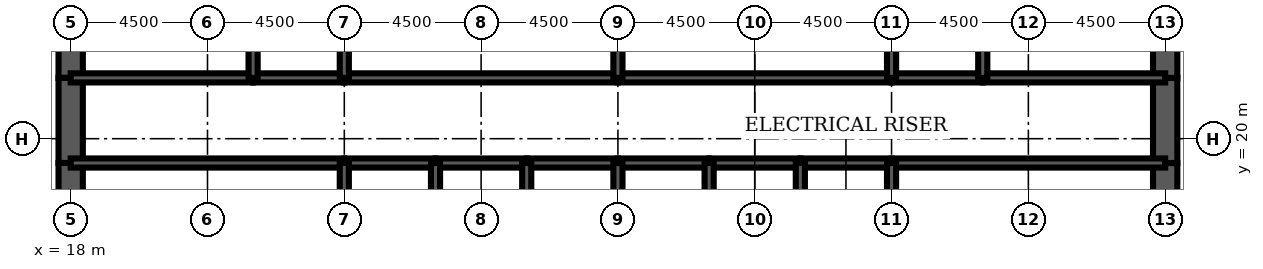
"""IFC4 building model, lengths in metres.
Left out: names, types, materials, properties, quantities, classifications, styles, units other than length and angle.
Written with IfcOpenShell. Run it as: python <this file> out.ifc"""

import sys

from ifc_helpers import new_model, si_unit, direction, frame, frame_2d, origin, place, context, subcontext, project, spatial, rectangle, extrude, element, fill, save


model = new_model("IFC4")
c1 = context("Model", 3, precision=1e-05, world=origin(), true_north=direction((0.0, 1.0)))
c2 = subcontext(c1, "Body", "Model", "MODEL_VIEW")
j1 = project(units=[si_unit("LENGTHUNIT", "METRE"), si_unit("PLANEANGLEUNIT", "RADIAN")], contexts=[c1])
p1 = place(None, origin())
s1 = spatial("IfcSite", under=j1, at=p1, CompositionType="ELEMENT")
p2 = place(p1, origin())
s2 = spatial("IfcBuilding", under=s1, at=p2, CompositionType="ELEMENT")
p3 = place(p2, frame((0.0, 0.0, 248.8)))
s3 = spatial("IfcBuildingStorey", under=s2, at=p3, CompositionType="ELEMENT", Elevation=248.8)
p4 = place(p3, frame((18.0, 26.0, 0.0), z_axis=(0.0, 0.0, 1.0), x_axis=(0.0, -1.0, 0.0)))
e1 = element("IfcWall", 1, at=p4, inside=s3, PredefinedType="SHEAR", context=c2, shape_type="SweptSolid", body=[
    extrude(rectangle(XDim=4.0, YDim=0.8, at=frame_2d((2.0, 0.0))), origin(), (0.0, 0.0, 1.0), 4.2),
])
p5 = place(p3, frame((18.0, 22.0, 0.0), z_axis=(0.0, 0.0, 1.0), x_axis=(0.0, -1.0, 0.0)))
e2 = element("IfcWall", 2, at=p5, inside=s3, PredefinedType="SHEAR", context=c2, shape_type="SweptSolid", body=[
    extrude(rectangle(XDim=2.8, YDim=0.8, at=frame_2d((1.4, 0.0))), origin(), (0.0, 0.0, 1.0), 4.2),
])
p6 = place(p5, frame((0.6, 0.0, 0.0)))
e3 = element("IfcOpeningElement", 3, at=p6, cuts=e2, PredefinedType="OPENING", context=c2, shape_type="SweptSolid", body=[
    extrude(rectangle(XDim=1.8, YDim=2.1, at=frame_2d((0.9, 1.05))), frame((0.0, 0.41, 0.0), z_axis=(0.0, -1.0, 0.0), x_axis=(1.0, 0.0, 0.0)), (0.0, 0.0, 1.0), 0.82),
])
for number, where, z_axis, x_axis in (
    (4, (18.0, 19.2, 0.0), (0.0, 0.0, 1.0), (0.0, -1.0, 0.0)),
    (5, (54.0, 16.0, 0.0), (0.0, 0.0, 1.0), (0.0, 1.0, 0.0)),
):
    element("IfcWall", number, at=place(p3, frame(where, z_axis=z_axis, x_axis=x_axis)), inside=s3, PredefinedType="SHEAR", context=c2, shape_type="SweptSolid", body=[
        extrude(rectangle(XDim=3.2, YDim=0.8, at=frame_2d((1.6, 0.0))), origin(), (0.0, 0.0, 1.0), 4.2),
    ])
p7 = place(p3, frame((54.0, 19.2, 0.0), z_axis=(0.0, 0.0, 1.0), x_axis=(0.0, 1.0, 0.0)))
e6 = element("IfcWall", 6, at=p7, inside=s3, PredefinedType="SHEAR", context=c2, shape_type="SweptSolid", body=[
    extrude(rectangle(XDim=2.8, YDim=0.8, at=frame_2d((1.4, 0.0))), origin(), (0.0, 0.0, 1.0), 4.2),
])
p8 = place(p7, frame((0.4, 0.0, 0.0)))
e7 = element("IfcOpeningElement", 7, at=p8, cuts=e6, PredefinedType="OPENING", context=c2, shape_type="SweptSolid", body=[
    extrude(rectangle(XDim=1.8, YDim=2.1, at=frame_2d((0.9, 1.05))), frame((0.0, 0.41, 0.0), z_axis=(0.0, -1.0, 0.0), x_axis=(1.0, 0.0, 0.0)), (0.0, 0.0, 1.0), 0.82),
])
p9 = place(p3, frame((54.0, 22.0, 0.0), z_axis=(0.0, 0.0, 1.0), x_axis=(0.0, 1.0, 0.0)))
e8 = element("IfcWall", 8, at=p9, inside=s3, PredefinedType="SHEAR", context=c2, shape_type="SweptSolid", body=[
    extrude(rectangle(XDim=4.0, YDim=0.8, at=frame_2d((2.0, 0.0))), origin(), (0.0, 0.0, 1.0), 4.2),
])
p10 = place(p3, frame((18.0, 19.2, 0.0), z_axis=(0.0, 0.0, 1.0), x_axis=(1.0, 0.0, 0.0)))
e9 = element("IfcWall", 9, at=p10, inside=s3, PredefinedType="SOLIDWALL", context=c2, shape_type="SweptSolid", body=[
    extrude(rectangle(XDim=9.0, YDim=0.3, at=frame_2d((4.5, 0.0))), origin(), (0.0, 0.0, 1.0), 4.2),
])
p11 = place(p10, frame((0.65, 0.0, 0.0)))
e10 = element("IfcOpeningElement", 10, at=p11, cuts=e9, PredefinedType="OPENING", context=c2, shape_type="SweptSolid", body=[
    extrude(rectangle(XDim=1.0, YDim=2.1, at=frame_2d((0.5, 1.05))), frame((0.0, 0.16, 0.0), z_axis=(0.0, -1.0, 0.0), x_axis=(1.0, 0.0, 0.0)), (0.0, 0.0, 1.0), 0.32),
])
p12 = place(p3, frame((27.0, 19.2, 0.0), z_axis=(0.0, 0.0, 1.0), x_axis=(1.0, 0.0, 0.0)))
e11 = element("IfcWall", 11, at=p12, inside=s3, PredefinedType="SOLIDWALL", context=c2, shape_type="SweptSolid", body=[
    extrude(rectangle(XDim=3.0, YDim=0.3, at=frame_2d((1.5, 0.0))), origin(), (0.0, 0.0, 1.0), 4.2),
])
p13 = place(p12, frame((0.95, 0.0, 0.0)))
e12 = element("IfcOpeningElement", 12, at=p13, cuts=e11, PredefinedType="OPENING", context=c2, shape_type="SweptSolid", body=[
    extrude(rectangle(XDim=1.1, YDim=2.2, at=frame_2d((0.55, 1.1))), frame((0.0, 0.16, 0.0), z_axis=(0.0, -1.0, 0.0), x_axis=(1.0, 0.0, 0.0)), (0.0, 0.0, 1.0), 0.32),
])
p14 = place(p3, frame((30.0, 19.2, 0.0), z_axis=(0.0, 0.0, 1.0), x_axis=(1.0, 0.0, 0.0)))
e13 = element("IfcWall", 13, at=p14, inside=s3, PredefinedType="SOLIDWALL", context=c2, shape_type="SweptSolid", body=[
    extrude(rectangle(XDim=3.0, YDim=0.3, at=frame_2d((1.5, 0.0))), origin(), (0.0, 0.0, 1.0), 4.2),
])
p15 = place(p14, frame((0.95, 0.0, 0.0)))
e14 = element("IfcOpeningElement", 14, at=p15, cuts=e13, PredefinedType="OPENING", context=c2, shape_type="SweptSolid", body=[
    extrude(rectangle(XDim=1.1, YDim=2.2, at=frame_2d((0.55, 1.1))), frame((0.0, 0.16, 0.0), z_axis=(0.0, -1.0, 0.0), x_axis=(1.0, 0.0, 0.0)), (0.0, 0.0, 1.0), 0.32),
])
p16 = place(p3, frame((33.0, 19.2, 0.0), z_axis=(0.0, 0.0, 1.0), x_axis=(1.0, 0.0, 0.0)))
e15 = element("IfcWall", 15, at=p16, inside=s3, PredefinedType="SOLIDWALL", context=c2, shape_type="SweptSolid", body=[
    extrude(rectangle(XDim=3.0, YDim=0.3, at=frame_2d((1.5, 0.0))), origin(), (0.0, 0.0, 1.0), 4.2),
])
p17 = place(p16, frame((0.95, 0.0, 0.0)))
e16 = element("IfcOpeningElement", 16, at=p17, cuts=e15, PredefinedType="OPENING", context=c2, shape_type="SweptSolid", body=[
    extrude(rectangle(XDim=1.1, YDim=2.2, at=frame_2d((0.55, 1.1))), frame((0.0, 0.16, 0.0), z_axis=(0.0, -1.0, 0.0), x_axis=(1.0, 0.0, 0.0)), (0.0, 0.0, 1.0), 0.32),
])
p18 = place(p3, frame((36.0, 19.2, 0.0), z_axis=(0.0, 0.0, 1.0), x_axis=(1.0, 0.0, 0.0)))
e17 = element("IfcWall", 17, at=p18, inside=s3, PredefinedType="SOLIDWALL", context=c2, shape_type="SweptSolid", body=[
    extrude(rectangle(XDim=3.0, YDim=0.3, at=frame_2d((1.5, 0.0))), origin(), (0.0, 0.0, 1.0), 4.2),
])
p19 = place(p18, frame((0.95, 0.0, 0.0)))
e18 = element("IfcOpeningElement", 18, at=p19, cuts=e17, PredefinedType="OPENING", context=c2, shape_type="SweptSolid", body=[
    extrude(rectangle(XDim=1.1, YDim=2.2, at=frame_2d((0.55, 1.1))), frame((0.0, 0.16, 0.0), z_axis=(0.0, -1.0, 0.0), x_axis=(1.0, 0.0, 0.0)), (0.0, 0.0, 1.0), 0.32),
])
p20 = place(p3, frame((39.0, 19.2, 0.0), z_axis=(0.0, 0.0, 1.0), x_axis=(1.0, 0.0, 0.0)))
e19 = element("IfcWall", 19, at=p20, inside=s3, PredefinedType="SOLIDWALL", context=c2, shape_type="SweptSolid", body=[
    extrude(rectangle(XDim=3.0, YDim=0.3, at=frame_2d((1.5, 0.0))), origin(), (0.0, 0.0, 1.0), 4.2),
])
p21 = place(p20, frame((1.0, 0.0, 0.0)))
e20 = element("IfcOpeningElement", 20, at=p21, cuts=e19, PredefinedType="OPENING", context=c2, shape_type="SweptSolid", body=[
    extrude(rectangle(XDim=1.0, YDim=2.1, at=frame_2d((0.5, 1.05))), frame((0.0, 0.16, 0.0), z_axis=(0.0, -1.0, 0.0), x_axis=(1.0, 0.0, 0.0)), (0.0, 0.0, 1.0), 0.32),
])
p22 = place(p3, frame((42.0, 19.2, 0.0), z_axis=(0.0, 0.0, 1.0), x_axis=(1.0, 0.0, 0.0)))
e21 = element("IfcWall", 21, at=p22, inside=s3, PredefinedType="SOLIDWALL", context=c2, shape_type="SweptSolid", body=[
    extrude(rectangle(XDim=3.0, YDim=0.3, at=frame_2d((1.5, 0.0))), origin(), (0.0, 0.0, 1.0), 4.2),
])
p23 = place(p22, frame((1.0, 0.0, 0.0)))
e22 = element("IfcOpeningElement", 22, at=p23, cuts=e21, PredefinedType="OPENING", context=c2, shape_type="SweptSolid", body=[
    extrude(rectangle(XDim=1.0, YDim=2.1, at=frame_2d((0.5, 1.05))), frame((0.0, 0.16, 0.0), z_axis=(0.0, -1.0, 0.0), x_axis=(1.0, 0.0, 0.0)), (0.0, 0.0, 1.0), 0.32),
])
p24 = place(p3, frame((45.0, 19.2, 0.0), z_axis=(0.0, 0.0, 1.0), x_axis=(1.0, 0.0, 0.0)))
e23 = element("IfcWall", 23, at=p24, inside=s3, PredefinedType="SOLIDWALL", context=c2, shape_type="SweptSolid", body=[
    extrude(rectangle(XDim=9.0, YDim=0.3, at=frame_2d((4.5, 0.0))), origin(), (0.0, 0.0, 1.0), 4.2),
])
p25 = place(p24, frame((7.35, 0.0, 0.0)))
e24 = element("IfcOpeningElement", 24, at=p25, cuts=e23, PredefinedType="OPENING", context=c2, shape_type="SweptSolid", body=[
    extrude(rectangle(XDim=1.0, YDim=2.1, at=frame_2d((0.5, 1.05))), frame((0.0, 0.16, 0.0), z_axis=(0.0, -1.0, 0.0), x_axis=(1.0, 0.0, 0.0)), (0.0, 0.0, 1.0), 0.32),
])
p26 = place(p3, frame((18.0, 22.0, 0.0), z_axis=(0.0, 0.0, 1.0), x_axis=(1.0, 0.0, 0.0)))
e25 = element("IfcWall", 25, at=p26, inside=s3, PredefinedType="SOLIDWALL", context=c2, shape_type="SweptSolid", body=[
    extrude(rectangle(XDim=6.0, YDim=0.3, at=frame_2d((3.0, 0.0))), origin(), (0.0, 0.0, 1.0), 4.2),
])
p27 = place(p26, frame((4.4, 0.0, 0.0)))
e26 = element("IfcOpeningElement", 26, at=p27, cuts=e25, PredefinedType="OPENING", context=c2, shape_type="SweptSolid", body=[
    extrude(rectangle(XDim=1.0, YDim=2.1, at=frame_2d((0.5, 1.05))), frame((0.0, 0.16, 0.0), z_axis=(0.0, -1.0, 0.0), x_axis=(1.0, 0.0, 0.0)), (0.0, 0.0, 1.0), 0.32),
])
p28 = place(p26, frame((0.95, 0.0, 0.0)))
e27 = element("IfcOpeningElement", 27, at=p28, cuts=e25, PredefinedType="OPENING", context=c2, shape_type="SweptSolid", body=[
    extrude(rectangle(XDim=1.0, YDim=2.1, at=frame_2d((0.5, 1.05))), frame((0.0, 0.16, 0.0), z_axis=(0.0, -1.0, 0.0), x_axis=(1.0, 0.0, 0.0)), (0.0, 0.0, 1.0), 0.32),
])
p29 = place(p3, frame((24.0, 22.0, 0.0), z_axis=(0.0, 0.0, 1.0), x_axis=(1.0, 0.0, 0.0)))
e28 = element("IfcWall", 28, at=p29, inside=s3, PredefinedType="SOLIDWALL", context=c2, shape_type="SweptSolid", body=[
    extrude(rectangle(XDim=3.0, YDim=0.3, at=frame_2d((1.5, 0.0))), origin(), (0.0, 0.0, 1.0), 4.2),
])
p30 = place(p29, frame((1.0, 0.0, 0.0)))
e29 = element("IfcOpeningElement", 29, at=p30, cuts=e28, PredefinedType="OPENING", context=c2, shape_type="SweptSolid", body=[
    extrude(rectangle(XDim=1.0, YDim=2.1, at=frame_2d((0.5, 1.05))), frame((0.0, 0.16, 0.0), z_axis=(0.0, -1.0, 0.0), x_axis=(1.0, 0.0, 0.0)), (0.0, 0.0, 1.0), 0.32),
])
p31 = place(p3, frame((27.0, 22.0, 0.0), z_axis=(0.0, 0.0, 1.0), x_axis=(1.0, 0.0, 0.0)))
e30 = element("IfcWall", 30, at=p31, inside=s3, PredefinedType="SOLIDWALL", context=c2, shape_type="SweptSolid", body=[
    extrude(rectangle(XDim=9.0, YDim=0.3, at=frame_2d((4.5, 0.0))), origin(), (0.0, 0.0, 1.0), 4.2),
])
p32 = place(p31, frame((4.0, 0.0, 0.0)))
e31 = element("IfcOpeningElement", 31, at=p32, cuts=e30, PredefinedType="OPENING", context=c2, shape_type="SweptSolid", body=[
    extrude(rectangle(XDim=1.0, YDim=2.1, at=frame_2d((0.5, 1.05))), frame((0.0, 0.16, 0.0), z_axis=(0.0, -1.0, 0.0), x_axis=(1.0, 0.0, 0.0)), (0.0, 0.0, 1.0), 0.32),
])
p33 = place(p3, frame((36.0, 22.0, 0.0), z_axis=(0.0, 0.0, 1.0), x_axis=(1.0, 0.0, 0.0)))
e32 = element("IfcWall", 32, at=p33, inside=s3, PredefinedType="SOLIDWALL", context=c2, shape_type="SweptSolid", body=[
    extrude(rectangle(XDim=9.0, YDim=0.3, at=frame_2d((4.5, 0.0))), origin(), (0.0, 0.0, 1.0), 4.2),
])
p34 = place(p33, frame((4.0, 0.0, 0.0)))
e33 = element("IfcOpeningElement", 33, at=p34, cuts=e32, PredefinedType="OPENING", context=c2, shape_type="SweptSolid", body=[
    extrude(rectangle(XDim=1.0, YDim=2.1, at=frame_2d((0.5, 1.05))), frame((0.0, 0.16, 0.0), z_axis=(0.0, -1.0, 0.0), x_axis=(1.0, 0.0, 0.0)), (0.0, 0.0, 1.0), 0.32),
])
p35 = place(p3, frame((45.0, 22.0, 0.0), z_axis=(0.0, 0.0, 1.0), x_axis=(1.0, 0.0, 0.0)))
e34 = element("IfcWall", 34, at=p35, inside=s3, PredefinedType="SOLIDWALL", context=c2, shape_type="SweptSolid", body=[
    extrude(rectangle(XDim=3.0, YDim=0.3, at=frame_2d((1.5, 0.0))), origin(), (0.0, 0.0, 1.0), 4.2),
])
p36 = place(p35, frame((1.0, 0.0, 0.0)))
e35 = element("IfcOpeningElement", 35, at=p36, cuts=e34, PredefinedType="OPENING", context=c2, shape_type="SweptSolid", body=[
    extrude(rectangle(XDim=1.0, YDim=2.1, at=frame_2d((0.5, 1.05))), frame((0.0, 0.16, 0.0), z_axis=(0.0, -1.0, 0.0), x_axis=(1.0, 0.0, 0.0)), (0.0, 0.0, 1.0), 0.32),
])
p37 = place(p3, frame((48.0, 22.0, 0.0), z_axis=(0.0, 0.0, 1.0), x_axis=(1.0, 0.0, 0.0)))
e36 = element("IfcWall", 36, at=p37, inside=s3, PredefinedType="SOLIDWALL", context=c2, shape_type="SweptSolid", body=[
    extrude(rectangle(XDim=6.0, YDim=0.3, at=frame_2d((3.0, 0.0))), origin(), (0.0, 0.0, 1.0), 4.2),
])
p38 = place(p37, frame((2.0, 0.0, 0.0)))
e37 = element("IfcOpeningElement", 37, at=p38, cuts=e36, PredefinedType="OPENING", context=c2, shape_type="SweptSolid", body=[
    extrude(rectangle(XDim=1.0, YDim=2.1, at=frame_2d((0.5, 1.05))), frame((0.0, 0.16, 0.0), z_axis=(0.0, -1.0, 0.0), x_axis=(1.0, 0.0, 0.0)), (0.0, 0.0, 1.0), 0.32),
])
for number, where, z_axis, x_axis in (
    (38, (27.0, 16.0, 0.0), (0.0, 0.0, 1.0), (0.0, 1.0, 0.0)),
    (39, (30.0, 16.0, 0.0), (0.0, 0.0, 1.0), (0.0, 1.0, 0.0)),
    (40, (33.0, 16.0, 0.0), (0.0, 0.0, 1.0), (0.0, 1.0, 0.0)),
    (41, (36.0, 16.0, 0.0), (0.0, 0.0, 1.0), (0.0, 1.0, 0.0)),
    (42, (39.0, 16.0, 0.0), (0.0, 0.0, 1.0), (0.0, 1.0, 0.0)),
    (43, (42.0, 16.0, 0.0), (0.0, 0.0, 1.0), (0.0, 1.0, 0.0)),
    (44, (45.0, 16.0, 0.0), (0.0, 0.0, 1.0), (0.0, 1.0, 0.0)),
):
    element("IfcWall", number, at=place(p3, frame(where, z_axis=z_axis, x_axis=x_axis)), inside=s3, PredefinedType="SOLIDWALL", context=c2, shape_type="SweptSolid", body=[
        extrude(rectangle(XDim=3.2, YDim=0.3, at=frame_2d((1.6, 0.0))), origin(), (0.0, 0.0, 1.0), 4.2),
    ])
for number, where, z_axis, x_axis in (
    (45, (24.0, 22.0, 0.0), (0.0, 0.0, 1.0), (0.0, 1.0, 0.0)),
    (46, (27.0, 22.0, 0.0), (0.0, 0.0, 1.0), (0.0, 1.0, 0.0)),
    (47, (36.0, 22.0, 0.0), (0.0, 0.0, 1.0), (0.0, 1.0, 0.0)),
    (48, (45.0, 22.0, 0.0), (0.0, 0.0, 1.0), (0.0, 1.0, 0.0)),
    (49, (48.0, 22.0, 0.0), (0.0, 0.0, 1.0), (0.0, 1.0, 0.0)),
):
    element("IfcWall", number, at=place(p3, frame(where, z_axis=z_axis, x_axis=x_axis)), inside=s3, PredefinedType="SOLIDWALL", context=c2, shape_type="SweptSolid", body=[
        extrude(rectangle(XDim=4.0, YDim=0.3, at=frame_2d((2.0, 0.0))), origin(), (0.0, 0.0, 1.0), 4.2),
    ])
p39 = place(p3, frame((42.0, 22.15, 0.0), z_axis=(0.0, 0.0, 1.0), x_axis=(0.0, 1.0, 0.0)))
e50 = element("IfcWall", 50, at=p39, inside=s3, PredefinedType="PARTITIONING", context=c2, shape_type="SweptSolid", body=[
    extrude(rectangle(XDim=3.7, YDim=0.15, at=frame_2d((1.85, 0.0))), origin(), (0.0, 0.0, 1.0), 3.0),
])
p40 = place(p39, frame((2.2, 0.0, 0.0)))
e51 = element("IfcOpeningElement", 51, at=p40, cuts=e50, PredefinedType="OPENING", context=c2, shape_type="SweptSolid", body=[
    extrude(rectangle(XDim=1.0, YDim=2.1, at=frame_2d((0.5, 1.05))), frame((0.0, 0.085, 0.0), z_axis=(0.0, -1.0, 0.0), x_axis=(1.0, 0.0, 0.0)), (0.0, 0.0, 1.0), 0.17),
])
p41 = place(p3, frame((20.575, 22.15, 0.0), z_axis=(0.0, 0.0, 1.0), x_axis=(0.0, 1.0, 0.0)))
e52 = element("IfcWall", 52, at=p41, inside=s3, PredefinedType="PARTITIONING", context=c2, shape_type="SweptSolid", body=[
    extrude(rectangle(XDim=3.7, YDim=0.15, at=frame_2d((1.85, 0.0))), origin(), (0.0, 0.0, 1.0), 3.0),
])
p42 = place(p3, frame((49.4, 19.35, 0.0), z_axis=(0.0, 0.0, 1.0), x_axis=(0.0, 1.0, 0.0)))
e53 = element("IfcWall", 53, at=p42, inside=s3, PredefinedType="PARTITIONING", context=c2, shape_type="SweptSolid", body=[
    extrude(rectangle(XDim=2.5, YDim=0.15, at=frame_2d((1.25, 0.0))), origin(), (0.0, 0.0, 1.0), 3.0),
])
p43 = place(p42, frame((1.15, 0.0, 0.0)))
e54 = element("IfcOpeningElement", 54, at=p43, cuts=e53, PredefinedType="OPENING", context=c2, shape_type="SweptSolid", body=[
    extrude(rectangle(XDim=1.0, YDim=2.1, at=frame_2d((0.5, 1.05))), frame((0.0, 0.085, 0.0), z_axis=(0.0, -1.0, 0.0), x_axis=(1.0, 0.0, 0.0)), (0.0, 0.0, 1.0), 0.17),
])
p44 = place(p43, origin())
e55 = element("IfcDoor", 55, at=p44, inside=s3, OperationType="SINGLE_SWING_RIGHT", PredefinedType="DOOR", context=c2, shape_type="SweptSolid", body=[
    extrude(rectangle(XDim=1.0, YDim=2.1, at=frame_2d((0.5, 1.05))), frame((0.0, 0.025, 0.0), z_axis=(0.0, -1.0, 0.0), x_axis=(1.0, 0.0, 0.0)), (0.0, 0.0, 1.0), 0.05),
])
fill(e54, e55)
p45 = place(p13, origin())
e56 = element("IfcDoor", 56, at=p45, inside=s3, OperationType="DOUBLE_DOOR_SLIDING", PredefinedType="USERDEFINED", context=c2, shape_type="SweptSolid", body=[
    extrude(rectangle(XDim=1.1, YDim=2.2, at=frame_2d((0.55, 1.1))), frame((0.0, 0.025, 0.0), z_axis=(0.0, -1.0, 0.0), x_axis=(1.0, 0.0, 0.0)), (0.0, 0.0, 1.0), 0.05),
])
fill(e12, e56)
p46 = place(p15, origin())
e57 = element("IfcDoor", 57, at=p46, inside=s3, OperationType="DOUBLE_DOOR_SLIDING", PredefinedType="USERDEFINED", context=c2, shape_type="SweptSolid", body=[
    extrude(rectangle(XDim=1.1, YDim=2.2, at=frame_2d((0.55, 1.1))), frame((0.0, 0.025, 0.0), z_axis=(0.0, -1.0, 0.0), x_axis=(1.0, 0.0, 0.0)), (0.0, 0.0, 1.0), 0.05),
])
fill(e14, e57)
p47 = place(p17, origin())
e58 = element("IfcDoor", 58, at=p47, inside=s3, OperationType="DOUBLE_DOOR_SLIDING", PredefinedType="USERDEFINED", context=c2, shape_type="SweptSolid", body=[
    extrude(rectangle(XDim=1.1, YDim=2.2, at=frame_2d((0.55, 1.1))), frame((0.0, 0.025, 0.0), z_axis=(0.0, -1.0, 0.0), x_axis=(1.0, 0.0, 0.0)), (0.0, 0.0, 1.0), 0.05),
])
fill(e16, e58)
p48 = place(p19, origin())
e59 = element("IfcDoor", 59, at=p48, inside=s3, OperationType="DOUBLE_DOOR_SLIDING", PredefinedType="USERDEFINED", context=c2, shape_type="SweptSolid", body=[
    extrude(rectangle(XDim=1.1, YDim=2.2, at=frame_2d((0.55, 1.1))), frame((0.0, 0.025, 0.0), z_axis=(0.0, -1.0, 0.0), x_axis=(1.0, 0.0, 0.0)), (0.0, 0.0, 1.0), 0.05),
])
fill(e18, e59)
p49 = place(p11, origin())
e60 = element("IfcDoor", 60, at=p49, inside=s3, OperationType="SINGLE_SWING_LEFT", PredefinedType="DOOR", context=c2, shape_type="SweptSolid", body=[
    extrude(rectangle(XDim=1.0, YDim=2.1, at=frame_2d((0.5, 1.05))), frame((0.0, 0.025, 0.0), z_axis=(0.0, -1.0, 0.0), x_axis=(1.0, 0.0, 0.0)), (0.0, 0.0, 1.0), 0.05),
])
fill(e10, e60)
p50 = place(p25, origin())
e61 = element("IfcDoor", 61, at=p50, inside=s3, OperationType="SINGLE_SWING_RIGHT", PredefinedType="DOOR", context=c2, shape_type="SweptSolid", body=[
    extrude(rectangle(XDim=1.0, YDim=2.1, at=frame_2d((0.5, 1.05))), frame((0.0, 0.025, 0.0), z_axis=(0.0, -1.0, 0.0), x_axis=(1.0, 0.0, 0.0)), (0.0, 0.0, 1.0), 0.05),
])
fill(e24, e61)
p51 = place(p6, origin())
e62 = element("IfcDoor", 62, at=p51, inside=s3, OperationType="SINGLE_SWING_LEFT", PredefinedType="DOOR", context=c2, shape_type="SweptSolid", body=[
    extrude(rectangle(XDim=1.8, YDim=2.1, at=frame_2d((0.9, 1.05))), frame((0.0, 0.4, 0.0), z_axis=(0.0, -1.0, 0.0), x_axis=(1.0, 0.0, 0.0)), (0.0, 0.0, 1.0), 0.8),
])
fill(e3, e62)
p52 = place(p8, origin())
e63 = element("IfcDoor", 63, at=p52, inside=s3, OperationType="SINGLE_SWING_LEFT", PredefinedType="DOOR", context=c2, shape_type="SweptSolid", body=[
    extrude(rectangle(XDim=1.8, YDim=2.1, at=frame_2d((0.9, 1.05))), frame((0.0, 0.4, 0.0), z_axis=(0.0, -1.0, 0.0), x_axis=(1.0, 0.0, 0.0)), (0.0, 0.0, 1.0), 0.8),
])
fill(e7, e63)
p53 = place(p27, origin())
e64 = element("IfcDoor", 64, at=p53, inside=s3, OperationType="SINGLE_SWING_RIGHT", PredefinedType="DOOR", context=c2, shape_type="SweptSolid", body=[
    extrude(rectangle(XDim=1.0, YDim=2.1, at=frame_2d((0.5, 1.05))), frame((0.0, 0.025, 0.0), z_axis=(0.0, -1.0, 0.0), x_axis=(1.0, 0.0, 0.0)), (0.0, 0.0, 1.0), 0.05),
])
fill(e26, e64)
p54 = place(p30, origin())
e65 = element("IfcDoor", 65, at=p54, inside=s3, OperationType="SINGLE_SWING_LEFT", PredefinedType="DOOR", context=c2, shape_type="SweptSolid", body=[
    extrude(rectangle(XDim=1.0, YDim=2.1, at=frame_2d((0.5, 1.05))), frame((0.0, 0.025, 0.0), z_axis=(0.0, -1.0, 0.0), x_axis=(1.0, 0.0, 0.0)), (0.0, 0.0, 1.0), 0.05),
])
fill(e29, e65)
p55 = place(p32, origin())
e66 = element("IfcDoor", 66, at=p55, inside=s3, OperationType="SINGLE_SWING_LEFT", PredefinedType="DOOR", context=c2, shape_type="SweptSolid", body=[
    extrude(rectangle(XDim=1.0, YDim=2.1, at=frame_2d((0.5, 1.05))), frame((0.0, 0.025, 0.0), z_axis=(0.0, -1.0, 0.0), x_axis=(1.0, 0.0, 0.0)), (0.0, 0.0, 1.0), 0.05),
])
fill(e31, e66)
p56 = place(p34, origin())
e67 = element("IfcDoor", 67, at=p56, inside=s3, OperationType="SINGLE_SWING_LEFT", PredefinedType="DOOR", context=c2, shape_type="SweptSolid", body=[
    extrude(rectangle(XDim=1.0, YDim=2.1, at=frame_2d((0.5, 1.05))), frame((0.0, 0.025, 0.0), z_axis=(0.0, -1.0, 0.0), x_axis=(1.0, 0.0, 0.0)), (0.0, 0.0, 1.0), 0.05),
])
fill(e33, e67)
p57 = place(p36, origin())
e68 = element("IfcDoor", 68, at=p57, inside=s3, OperationType="SINGLE_SWING_LEFT", PredefinedType="DOOR", context=c2, shape_type="SweptSolid", body=[
    extrude(rectangle(XDim=1.0, YDim=2.1, at=frame_2d((0.5, 1.05))), frame((0.0, 0.025, 0.0), z_axis=(0.0, -1.0, 0.0), x_axis=(1.0, 0.0, 0.0)), (0.0, 0.0, 1.0), 0.05),
])
fill(e35, e68)
p58 = place(p38, origin())
e69 = element("IfcDoor", 69, at=p58, inside=s3, OperationType="SINGLE_SWING_LEFT", PredefinedType="DOOR", context=c2, shape_type="SweptSolid", body=[
    extrude(rectangle(XDim=1.0, YDim=2.1, at=frame_2d((0.5, 1.05))), frame((0.0, 0.025, 0.0), z_axis=(0.0, -1.0, 0.0), x_axis=(1.0, 0.0, 0.0)), (0.0, 0.0, 1.0), 0.05),
])
fill(e37, e69)
p59 = place(p28, origin())
e70 = element("IfcDoor", 70, at=p59, inside=s3, OperationType="SINGLE_SWING_LEFT", PredefinedType="DOOR", context=c2, shape_type="SweptSolid", body=[
    extrude(rectangle(XDim=1.0, YDim=2.1, at=frame_2d((0.5, 1.05))), frame((0.0, 0.025, 0.0), z_axis=(0.0, -1.0, 0.0), x_axis=(1.0, 0.0, 0.0)), (0.0, 0.0, 1.0), 0.05),
])
fill(e27, e70)
p60 = place(p21, origin())
e71 = element("IfcDoor", 71, at=p60, inside=s3, OperationType="SINGLE_SWING_LEFT", PredefinedType="DOOR", context=c2, shape_type="SweptSolid", body=[
    extrude(rectangle(XDim=1.0, YDim=2.1, at=frame_2d((0.5, 1.05))), frame((0.0, 0.025, 0.0), z_axis=(0.0, -1.0, 0.0), x_axis=(1.0, 0.0, 0.0)), (0.0, 0.0, 1.0), 0.05),
])
fill(e20, e71)
p61 = place(p23, origin())
e72 = element("IfcDoor", 72, at=p61, inside=s3, OperationType="SINGLE_SWING_LEFT", PredefinedType="DOOR", context=c2, shape_type="SweptSolid", body=[
    extrude(rectangle(XDim=1.0, YDim=2.1, at=frame_2d((0.5, 1.05))), frame((0.0, 0.025, 0.0), z_axis=(0.0, -1.0, 0.0), x_axis=(1.0, 0.0, 0.0)), (0.0, 0.0, 1.0), 0.05),
])
fill(e22, e72)
save(model, sys.argv[1])
